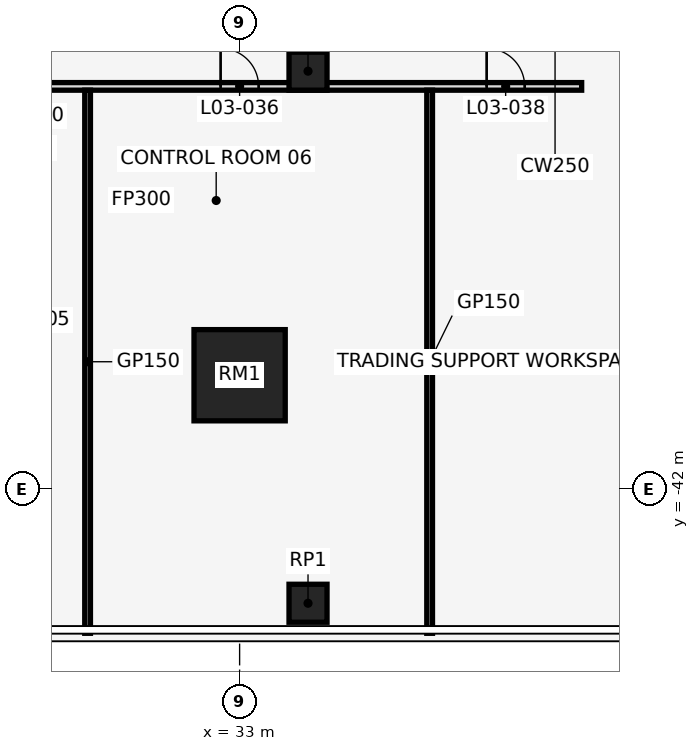
"""IFC4 building model, lengths in metres.
Left out: names, types, materials, properties, quantities, classifications, styles, units other than length and angle.
Written with IfcOpenShell. Run it as: python <this file> out.ifc"""

import sys

from ifc_helpers import new_model, si_unit, direction, frame, frame_2d, origin, origin_2d, place, context, subcontext, project, spatial, rectangle, extrude, element, fill, save


model = new_model("IFC4")
c1 = context("Model", 3, precision=1e-05, world=origin(), true_north=direction((0.0, 1.0)))
c2 = subcontext(c1, "Body", "Model", "MODEL_VIEW")
j1 = project(units=[si_unit("LENGTHUNIT", "METRE"), si_unit("PLANEANGLEUNIT", "RADIAN")], contexts=[c1])
p1 = place(None, origin())
s1 = spatial("IfcSite", under=j1, at=p1, CompositionType="ELEMENT")
p2 = place(p1, origin())
s2 = spatial("IfcBuilding", under=s1, at=p2, CompositionType="ELEMENT")
p3 = place(p2, frame((0.0, 0.0, 20.0)))
s3 = spatial("IfcBuildingStorey", under=s2, at=p3, CompositionType="ELEMENT", Elevation=20.0)
p4 = place(p3, frame((33.0, -39.0, 0.0), z_axis=(0.0, 0.0, 1.0), x_axis=(1.0, 0.0, 0.0)))
e1 = element("IfcColumn", 1, at=p4, inside=s3, PredefinedType="COLUMN", context=c2, shape_type="SweptSolid", body=[
    extrude(rectangle(XDim=2.4, YDim=2.4, at=origin_2d()), origin(), (0.0, 0.0, 1.0), 5.0),
])
for number, where, z_axis, x_axis in (
    (2, (34.8, -31.0, 0.0), (0.0, 0.0, 1.0), (1.0, 0.0, 0.0)),
    (3, (34.8, -45.0, 0.0), (0.0, 0.0, 1.0), (1.0, 0.0, 0.0)),
):
    element("IfcColumn", number, at=place(p3, frame(where, z_axis=z_axis, x_axis=x_axis)), inside=s3, PredefinedType="COLUMN", context=c2, shape_type="SweptSolid", body=[
        extrude(rectangle(XDim=1.0, YDim=1.0, at=origin_2d()), origin(), (0.0, 0.0, 1.0), 5.0),
    ])
p5 = place(p3, frame((11.6, -31.4, 0.0), z_axis=(0.0, 0.0, 1.0), x_axis=(1.0, 0.0, 0.0)))
e4 = element("IfcWall", 4, at=p5, inside=s3, PredefinedType="PARTITIONING", context=c2, shape_type="SweptSolid", body=[
    extrude(rectangle(XDim=30.4, YDim=0.2, at=frame_2d((15.2, 0.0))), origin(), (0.0, 0.0, 1.0), 4.7),
])
p6 = place(p5, frame((2.0, 0.0, 0.0)))
e5 = element("IfcOpeningElement", 5, at=p6, cuts=e4, PredefinedType="OPENING", context=c2, shape_type="SweptSolid", body=[
    extrude(rectangle(XDim=1.0, YDim=2.1, at=frame_2d((0.5, 1.05))), frame((0.0, 0.112, 0.0), z_axis=(0.0, -1.0, 0.0), x_axis=(1.0, 0.0, 0.0)), (0.0, 0.0, 1.0), 0.224),
])
p7 = place(p5, frame((9.3, 0.0, 0.0)))
e6 = element("IfcOpeningElement", 6, at=p7, cuts=e4, PredefinedType="OPENING", context=c2, shape_type="SweptSolid", body=[
    extrude(rectangle(XDim=1.0, YDim=2.1, at=frame_2d((0.5, 1.05))), frame((0.0, 0.112, 0.0), z_axis=(0.0, -1.0, 0.0), x_axis=(1.0, 0.0, 0.0)), (0.0, 0.0, 1.0), 0.224),
])
p8 = place(p5, frame((12.2, 0.0, 0.0)))
e7 = element("IfcOpeningElement", 7, at=p8, cuts=e4, PredefinedType="OPENING", context=c2, shape_type="SweptSolid", body=[
    extrude(rectangle(XDim=1.0, YDim=2.1, at=frame_2d((0.5, 1.05))), frame((0.0, 0.112, 0.0), z_axis=(0.0, -1.0, 0.0), x_axis=(1.0, 0.0, 0.0)), (0.0, 0.0, 1.0), 0.224),
])
p9 = place(p5, frame((20.9, 0.0, 0.0)))
e8 = element("IfcOpeningElement", 8, at=p9, cuts=e4, PredefinedType="OPENING", context=c2, shape_type="SweptSolid", body=[
    extrude(rectangle(XDim=1.0, YDim=2.1, at=frame_2d((0.5, 1.05))), frame((0.0, 0.112, 0.0), z_axis=(0.0, -1.0, 0.0), x_axis=(1.0, 0.0, 0.0)), (0.0, 0.0, 1.0), 0.224),
])
p10 = place(p5, frame((27.9, 0.0, 0.0)))
e9 = element("IfcOpeningElement", 9, at=p10, cuts=e4, PredefinedType="OPENING", context=c2, shape_type="SweptSolid", body=[
    extrude(rectangle(XDim=1.0, YDim=2.1, at=frame_2d((0.5, 1.05))), frame((0.0, 0.112, 0.0), z_axis=(0.0, -1.0, 0.0), x_axis=(1.0, 0.0, 0.0)), (0.0, 0.0, 1.0), 0.224),
])
for number, where, z_axis, x_axis in (
    (10, (29.0, -45.79, 0.0), (0.0, 0.0, 1.0), (0.0, 1.0, 0.0)),
    (11, (38.0, -45.79, 0.0), (0.0, 0.0, 1.0), (0.0, 1.0, 0.0)),
):
    element("IfcWall", number, at=place(p3, frame(where, z_axis=z_axis, x_axis=x_axis)), inside=s3, PredefinedType="PARTITIONING", context=c2, shape_type="SweptSolid", body=[
        extrude(rectangle(XDim=14.29, YDim=0.15, at=frame_2d((7.145, 0.0))), origin(), (0.0, 0.0, 1.0), 4.7),
    ])
p11 = place(p9, frame((1.0, 0.0, 0.0), z_axis=(0.0, 0.0, 1.0), x_axis=(-1.0, 0.0, 0.0)))
e12 = element("IfcDoor", 12, at=p11, inside=s3, OperationType="SINGLE_SWING_RIGHT", PredefinedType="DOOR", context=c2, shape_type="SweptSolid", body=[
    extrude(rectangle(XDim=1.0, YDim=2.1, at=frame_2d((0.5, 1.05))), frame((0.0, 0.025, 0.0), z_axis=(0.0, -1.0, 0.0), x_axis=(1.0, 0.0, 0.0)), (0.0, 0.0, 1.0), 0.05),
])
fill(e8, e12)
p12 = place(p10, frame((1.0, 0.0, 0.0), z_axis=(0.0, 0.0, 1.0), x_axis=(-1.0, 0.0, 0.0)))
e13 = element("IfcDoor", 13, at=p12, inside=s3, OperationType="SINGLE_SWING_RIGHT", PredefinedType="DOOR", context=c2, shape_type="SweptSolid", body=[
    extrude(rectangle(XDim=1.0, YDim=2.1, at=frame_2d((0.5, 1.05))), frame((0.0, 0.025, 0.0), z_axis=(0.0, -1.0, 0.0), x_axis=(1.0, 0.0, 0.0)), (0.0, 0.0, 1.0), 0.05),
])
fill(e9, e13)
save(model, sys.argv[1])
